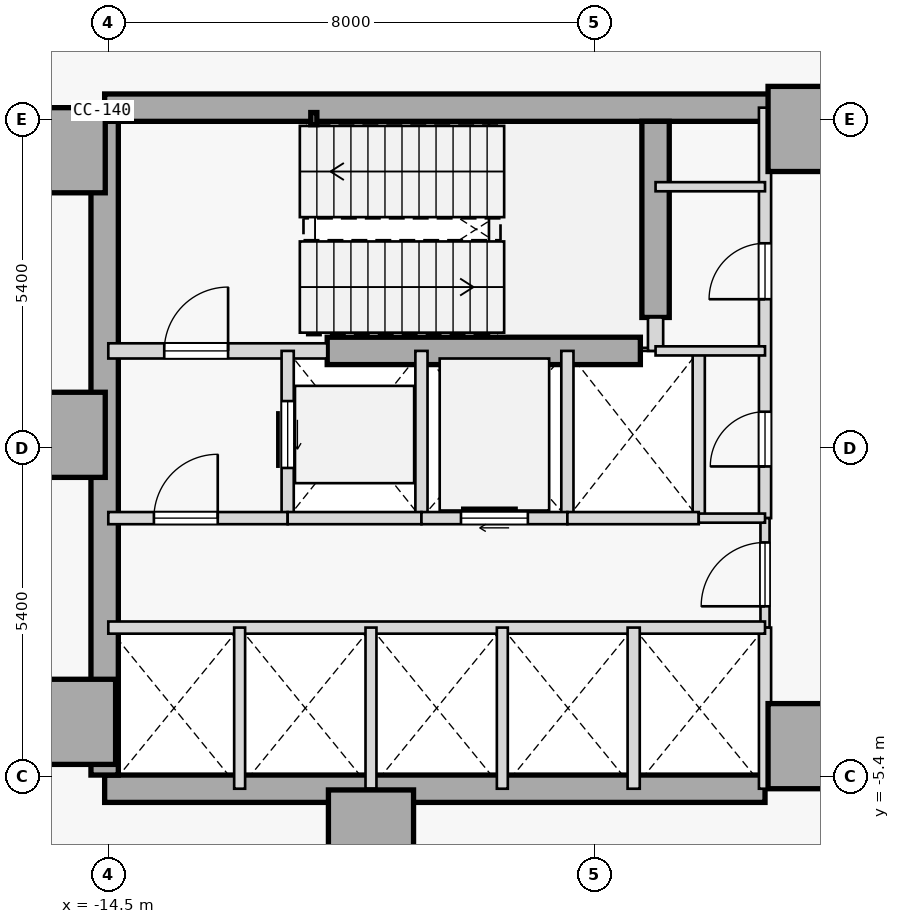
"""IFC4 building model, lengths in metres.
Left out: names, types, materials, properties, quantities, classifications, styles, units other than length and angle.
Written with IfcOpenShell. Run it as: python <this file> out.ifc"""

import sys

from ifc_helpers import new_model, si_unit, direction, frame, frame_2d, origin, origin_2d, place, context, subcontext, project, spatial, rectangle, hollow_rectangle, extrude, element, fill, save


model = new_model("IFC4")
c1 = context("Model", 3, precision=1e-05, world=origin(), true_north=direction((0.0, 1.0)))
c2 = subcontext(c1, "Body", "Model", "MODEL_VIEW")
j1 = project(units=[si_unit("LENGTHUNIT", "METRE"), si_unit("PLANEANGLEUNIT", "RADIAN")], contexts=[c1])
p1 = place(None, origin())
s1 = spatial("IfcSite", under=j1, at=p1, CompositionType="ELEMENT")
p2 = place(p1, origin())
s2 = spatial("IfcBuilding", under=s1, at=p2, CompositionType="ELEMENT")
p3 = place(p2, frame((0.0, 0.0, 78.8)))
s3 = spatial("IfcBuildingStorey", under=s2, at=p3, CompositionType="ELEMENT", Elevation=78.8)
for number, where, z_axis, x_axis in (
    (1, (-15.25, 4.9, 0.0), (0.0, 0.0, 1.0), (1.0, 0.0, 0.0)),
    (2, (-15.25, 0.22, 0.0), (0.0, 0.0, 1.0), (1.0, 0.0, 0.0)),
    (3, (-15.08, -4.5, 0.0), (0.0, 0.0, 1.0), (1.0, 0.0, 0.0)),
    (4, (-10.18, -6.32, 0.0), (0.0, 0.0, 1.0), (1.0, 0.0, 0.0)),
    (5, (-2.95, -4.9, 0.0), (0.0, 0.0, 1.0), (1.0, 0.0, 0.0)),
    (6, (-2.95, 5.25, 0.0), (0.0, 0.0, 1.0), (1.0, 0.0, 0.0)),
):
    element("IfcColumn", number, at=place(p3, frame(where, z_axis=z_axis, x_axis=x_axis)), inside=s3, PredefinedType="COLUMN", context=c2, shape_type="SweptSolid", body=[
        extrude(rectangle(XDim=1.4, YDim=1.4, at=origin_2d()), origin(), (0.0, 0.0, 1.0), 4.4),
    ])
p4 = place(p3, frame((-14.56, 5.6, 0.0), z_axis=(0.0, 0.0, 1.0), x_axis=(1.0, 0.0, 0.0)))
e7 = element("IfcWall", 7, at=p4, inside=s3, PredefinedType="SHEAR", context=c2, shape_type="SweptSolid", body=[
    extrude(rectangle(XDim=11.41, YDim=0.45, at=frame_2d((5.705, 0.0))), origin(), (0.0, 0.0, 1.0), 4.15),
])
p5 = place(p3, frame((-14.56, -5.6, 0.0), z_axis=(0.0, 0.0, 1.0), x_axis=(1.0, 0.0, 0.0)))
e8 = element("IfcWall", 8, at=p5, inside=s3, PredefinedType="SHEAR", context=c2, shape_type="SweptSolid", body=[
    extrude(rectangle(XDim=10.86, YDim=0.45, at=frame_2d((5.43, 0.0))), origin(), (0.0, 0.0, 1.0), 4.15),
])
p6 = place(p3, frame((-14.56, -5.375, 0.0), z_axis=(0.0, 0.0, 1.0), x_axis=(0.0, 1.0, 0.0)))
e9 = element("IfcWall", 9, at=p6, inside=s3, PredefinedType="SHEAR", context=c2, shape_type="SweptSolid", body=[
    extrude(rectangle(XDim=10.75, YDim=0.45, at=frame_2d((5.375, 0.0))), origin(), (0.0, 0.0, 1.0), 4.15),
])
p7 = place(p3, frame((-5.5, 2.15, 0.0), z_axis=(0.0, 0.0, 1.0), x_axis=(0.0, 1.0, 0.0)))
e10 = element("IfcWall", 10, at=p7, inside=s3, PredefinedType="SHEAR", context=c2, shape_type="SweptSolid", body=[
    extrude(rectangle(XDim=3.225, YDim=0.45, at=frame_2d((1.613, 0.0))), origin(), (0.0, 0.0, 1.0), 4.15),
])
p8 = place(p3, frame((-10.9, 1.6, 0.0), z_axis=(0.0, 0.0, 1.0), x_axis=(1.0, 0.0, 0.0)))
e11 = element("IfcWall", 11, at=p8, inside=s3, PredefinedType="SHEAR", context=c2, shape_type="SweptSolid", body=[
    extrude(rectangle(XDim=5.15, YDim=0.45, at=frame_2d((2.575, 0.0))), origin(), (0.0, 0.0, 1.0), 4.15),
])
p9 = place(p3, frame((-11.12, 5.42, 0.0), z_axis=(0.0, 0.0, 1.0), x_axis=(1.0, 0.0, 0.0)))
e12 = element("IfcColumn", 12, at=p9, inside=s3, PredefinedType="COLUMN", context=c2, shape_type="SweptSolid", body=[
    extrude(hollow_rectangle(XDim=0.1, YDim=0.2, WallThickness=0.008, at=origin_2d()), origin(), (0.0, 0.0, 1.0), 4.4),
])
p10 = place(p3, frame((-14.5, 1.6, 0.0), z_axis=(0.0, 0.0, 1.0), x_axis=(1.0, 0.0, 0.0)))
e13 = element("IfcWall", 13, at=p10, inside=s3, PredefinedType="STANDARD", context=c2, shape_type="SweptSolid", body=[
    extrude(rectangle(XDim=3.6, YDim=0.25, at=frame_2d((1.8, 0.0))), origin(), (0.0, 0.0, 1.0), 4.15),
])
p11 = place(p10, frame((0.92, 0.0, 0.0)))
e14 = element("IfcOpeningElement", 14, at=p11, cuts=e13, PredefinedType="OPENING", context=c2, shape_type="SweptSolid", body=[
    extrude(rectangle(XDim=1.05, YDim=2.15, at=frame_2d((0.525, 1.075))), frame((0.0, 0.135, 0.0), z_axis=(0.0, -1.0, 0.0), x_axis=(1.0, 0.0, 0.0)), (0.0, 0.0, 1.0), 0.27),
])
p12 = place(p3, frame((-5.5, 1.6, 0.0), z_axis=(0.0, 0.0, 1.0), x_axis=(0.0, 1.0, 0.0)))
e15 = element("IfcWall", 15, at=p12, inside=s3, PredefinedType="STANDARD", context=c2, shape_type="SweptSolid", body=[
    extrude(rectangle(XDim=0.55, YDim=0.25, at=frame_2d((0.275, 0.0))), origin(), (0.0, 0.0, 1.0), 4.15),
])
p13 = place(p3, frame((-3.7, -1.15, 0.0), z_axis=(0.0, 0.0, 1.0), x_axis=(0.0, 1.0, 0.0)))
e16 = element("IfcWall", 16, at=p13, inside=s3, PredefinedType="STANDARD", context=c2, shape_type="SweptSolid", body=[
    extrude(rectangle(XDim=6.75, YDim=0.2, at=frame_2d((3.375, 0.0))), origin(), (0.0, 0.0, 1.0), 4.15),
])
p14 = place(p13, frame((3.6, 0.0, 0.0)))
e17 = element("IfcOpeningElement", 17, at=p14, cuts=e16, PredefinedType="OPENING", context=c2, shape_type="SweptSolid", body=[
    extrude(rectangle(XDim=0.92, YDim=2.15, at=frame_2d((0.46, 1.075))), frame((0.0, 0.11, 0.0), z_axis=(0.0, -1.0, 0.0), x_axis=(1.0, 0.0, 0.0)), (0.0, 0.0, 1.0), 0.22),
])
p15 = place(p13, frame((0.85, 0.0, 0.0)))
e18 = element("IfcOpeningElement", 18, at=p15, cuts=e16, PredefinedType="OPENING", context=c2, shape_type="SweptSolid", body=[
    extrude(rectangle(XDim=0.9, YDim=2.15, at=frame_2d((0.45, 1.075))), frame((0.0, 0.11, 0.0), z_axis=(0.0, -1.0, 0.0), x_axis=(1.0, 0.0, 0.0)), (0.0, 0.0, 1.0), 0.22),
])
p16 = place(p3, frame((-3.7, -2.95, 0.0), z_axis=(0.0, 0.0, 1.0), x_axis=(0.0, 1.0, 0.0)))
e19 = element("IfcWall", 19, at=p16, inside=s3, PredefinedType="PARTITIONING", context=c2, shape_type="SweptSolid", body=[
    extrude(rectangle(XDim=1.8, YDim=0.15, at=frame_2d((0.9, 0.0))), origin(), (0.0, 0.0, 1.0), 4.15),
])
p17 = place(p16, frame((0.35, 0.0, 0.0)))
e20 = element("IfcOpeningElement", 20, at=p17, cuts=e19, PredefinedType="OPENING", context=c2, shape_type="SweptSolid", body=[
    extrude(rectangle(XDim=1.05, YDim=2.18, at=frame_2d((0.525, 1.09))), frame((0.0, 0.085, 0.0), z_axis=(0.0, -1.0, 0.0), x_axis=(1.0, 0.0, 0.0)), (0.0, 0.0, 1.0), 0.17),
])
p18 = place(p3, frame((-3.7, -5.6, 0.0), z_axis=(0.0, 0.0, 1.0), x_axis=(0.0, 1.0, 0.0)))
e21 = element("IfcWall", 21, at=p18, inside=s3, PredefinedType="STANDARD", context=c2, shape_type="SweptSolid", body=[
    extrude(rectangle(XDim=2.65, YDim=0.2, at=frame_2d((1.325, 0.0))), origin(), (0.0, 0.0, 1.0), 4.15),
])
p19 = place(p3, frame((-11.55, -1.15, 0.0), z_axis=(0.0, 0.0, 1.0), x_axis=(0.0, 1.0, 0.0)))
e22 = element("IfcWall", 22, at=p19, inside=s3, PredefinedType="STANDARD", context=c2, shape_type="SweptSolid", body=[
    extrude(rectangle(XDim=2.75, YDim=0.2, at=frame_2d((1.375, 0.0))), origin(), (0.0, 0.0, 1.0), 4.15),
])
p20 = place(p19, frame((0.825, 0.0, 0.0)))
e23 = element("IfcOpeningElement", 23, at=p20, cuts=e22, PredefinedType="OPENING", context=c2, shape_type="SweptSolid", body=[
    extrude(rectangle(XDim=1.1, YDim=2.15, at=frame_2d((0.55, 1.075))), frame((0.0, 0.11, 0.0), z_axis=(0.0, -1.0, 0.0), x_axis=(1.0, 0.0, 0.0)), (0.0, 0.0, 1.0), 0.22),
])
p21 = place(p3, frame((-9.35, -1.15, 0.0), z_axis=(0.0, 0.0, 1.0), x_axis=(0.0, 1.0, 0.0)))
e24 = element("IfcWall", 24, at=p21, inside=s3, PredefinedType="STANDARD", context=c2, shape_type="SweptSolid", body=[
    extrude(rectangle(XDim=2.75, YDim=0.2, at=frame_2d((1.375, 0.0))), origin(), (0.0, 0.0, 1.0), 4.15),
])
p22 = place(p3, frame((-14.5, -1.15, 0.0), z_axis=(0.0, 0.0, 1.0), x_axis=(1.0, 0.0, 0.0)))
e25 = element("IfcWall", 25, at=p22, inside=s3, PredefinedType="STANDARD", context=c2, shape_type="SweptSolid", body=[
    extrude(rectangle(XDim=2.95, YDim=0.2, at=frame_2d((1.475, 0.0))), origin(), (0.0, 0.0, 1.0), 4.15),
])
p23 = place(p22, frame((0.75, 0.0, 0.0)))
e26 = element("IfcOpeningElement", 26, at=p23, cuts=e25, PredefinedType="OPENING", context=c2, shape_type="SweptSolid", body=[
    extrude(rectangle(XDim=1.05, YDim=2.18, at=frame_2d((0.525, 1.09))), frame((0.0, 0.11, 0.0), z_axis=(0.0, -1.0, 0.0), x_axis=(1.0, 0.0, 0.0)), (0.0, 0.0, 1.0), 0.22),
])
p24 = place(p3, frame((-11.55, -1.15, 0.0), z_axis=(0.0, 0.0, 1.0), x_axis=(1.0, 0.0, 0.0)))
e27 = element("IfcWall", 27, at=p24, inside=s3, PredefinedType="STANDARD", context=c2, shape_type="SweptSolid", body=[
    extrude(rectangle(XDim=2.2, YDim=0.2, at=frame_2d((1.1, 0.0))), origin(), (0.0, 0.0, 1.0), 4.15),
])
p25 = place(p3, frame((-6.95, -1.15, 0.0), z_axis=(0.0, 0.0, 1.0), x_axis=(0.0, 1.0, 0.0)))
e28 = element("IfcWall", 28, at=p25, inside=s3, PredefinedType="STANDARD", context=c2, shape_type="SweptSolid", body=[
    extrude(rectangle(XDim=2.75, YDim=0.2, at=frame_2d((1.375, 0.0))), origin(), (0.0, 0.0, 1.0), 4.15),
])
p26 = place(p3, frame((-9.35, -1.15, 0.0), z_axis=(0.0, 0.0, 1.0), x_axis=(1.0, 0.0, 0.0)))
e29 = element("IfcWall", 29, at=p26, inside=s3, PredefinedType="STANDARD", context=c2, shape_type="SweptSolid", body=[
    extrude(rectangle(XDim=2.4, YDim=0.2, at=frame_2d((1.2, 0.0))), origin(), (0.0, 0.0, 1.0), 4.15),
])
p27 = place(p26, frame((0.65, 0.0, 0.0)))
e30 = element("IfcOpeningElement", 30, at=p27, cuts=e29, PredefinedType="OPENING", context=c2, shape_type="SweptSolid", body=[
    extrude(rectangle(XDim=1.1, YDim=2.15, at=frame_2d((0.55, 1.075))), frame((0.0, 0.11, 0.0), z_axis=(0.0, -1.0, 0.0), x_axis=(1.0, 0.0, 0.0)), (0.0, 0.0, 1.0), 0.22),
])
p28 = place(p3, frame((-4.79, -1.15, 0.0), z_axis=(0.0, 0.0, 1.0), x_axis=(0.0, 1.0, 0.0)))
e31 = element("IfcWall", 31, at=p28, inside=s3, PredefinedType="STANDARD", context=c2, shape_type="SweptSolid", body=[
    extrude(rectangle(XDim=2.75, YDim=0.2, at=frame_2d((1.375, 0.0))), origin(), (0.0, 0.0, 1.0), 4.15),
])
p29 = place(p3, frame((-6.95, -1.15, 0.0), z_axis=(0.0, 0.0, 1.0), x_axis=(1.0, 0.0, 0.0)))
e32 = element("IfcWall", 32, at=p29, inside=s3, PredefinedType="STANDARD", context=c2, shape_type="SweptSolid", body=[
    extrude(rectangle(XDim=2.16, YDim=0.2, at=frame_2d((1.08, 0.0))), origin(), (0.0, 0.0, 1.0), 4.15),
])
p30 = place(p3, frame((-4.79, -1.15, 0.0), z_axis=(0.0, 0.0, 1.0), x_axis=(1.0, 0.0, 0.0)))
e33 = element("IfcWall", 33, at=p30, inside=s3, PredefinedType="PARTITIONING", context=c2, shape_type="SweptSolid", body=[
    extrude(rectangle(XDim=1.09, YDim=0.15, at=frame_2d((0.545, 0.0))), origin(), (0.0, 0.0, 1.0), 4.15),
])
p31 = place(p3, frame((-14.5, -2.95, 0.0), z_axis=(0.0, 0.0, 1.0), x_axis=(1.0, 0.0, 0.0)))
e34 = element("IfcWall", 34, at=p31, inside=s3, PredefinedType="STANDARD", context=c2, shape_type="SweptSolid", body=[
    extrude(rectangle(XDim=10.8, YDim=0.2, at=frame_2d((5.4, 0.0))), origin(), (0.0, 0.0, 1.0), 4.15),
])
p32 = place(p3, frame((-5.86, -5.6, 0.0), z_axis=(0.0, 0.0, 1.0), x_axis=(0.0, 1.0, 0.0)))
e35 = element("IfcWall", 35, at=p32, inside=s3, PredefinedType="STANDARD", context=c2, shape_type="SweptSolid", body=[
    extrude(rectangle(XDim=2.65, YDim=0.2, at=frame_2d((1.325, 0.0))), origin(), (0.0, 0.0, 1.0), 4.15),
])
for number, where, z_axis, x_axis in (
    (36, (-12.34, -5.6, 0.0), (0.0, 0.0, 1.0), (0.0, 1.0, 0.0)),
    (37, (-10.18, -5.6, 0.0), (0.0, 0.0, 1.0), (0.0, 1.0, 0.0)),
    (38, (-8.02, -5.6, 0.0), (0.0, 0.0, 1.0), (0.0, 1.0, 0.0)),
):
    element("IfcWall", number, at=place(p3, frame(where, z_axis=z_axis, x_axis=x_axis)), inside=s3, PredefinedType="STANDARD", context=c2, shape_type="SweptSolid", body=[
        extrude(rectangle(XDim=2.65, YDim=0.18, at=frame_2d((1.325, 0.0))), origin(), (0.0, 0.0, 1.0), 4.15),
    ])
for number, where, z_axis, x_axis in (
    (39, (-5.5, 4.3, 0.0), (0.0, 0.0, 1.0), (1.0, 0.0, 0.0)),
    (40, (-5.5, 1.6, 0.0), (0.0, 0.0, 1.0), (1.0, 0.0, 0.0)),
):
    element("IfcWall", number, at=place(p3, frame(where, z_axis=z_axis, x_axis=x_axis)), inside=s3, PredefinedType="PARTITIONING", context=c2, shape_type="SweptSolid", body=[
        extrude(rectangle(XDim=1.8, YDim=0.15, at=frame_2d((0.9, 0.0))), origin(), (0.0, 0.0, 1.0), 4.15),
    ])
p33 = place(p11, origin())
e41 = element("IfcDoor", 41, at=p33, inside=s3, OperationType="SINGLE_SWING_RIGHT", PredefinedType="DOOR", context=c2, shape_type="SweptSolid", body=[
    extrude(rectangle(XDim=1.05, YDim=2.15, at=frame_2d((0.525, 1.075))), frame((0.0, 0.025, 0.0), z_axis=(0.0, -1.0, 0.0), x_axis=(1.0, 0.0, 0.0)), (0.0, 0.0, 1.0), 0.05),
])
fill(e14, e41)
p34 = place(p23, origin())
e42 = element("IfcDoor", 42, at=p34, inside=s3, OperationType="SINGLE_SWING_RIGHT", PredefinedType="DOOR", context=c2, shape_type="SweptSolid", body=[
    extrude(rectangle(XDim=1.05, YDim=2.18, at=frame_2d((0.525, 1.09))), frame((0.0, 0.025, 0.0), z_axis=(0.0, -1.0, 0.0), x_axis=(1.0, 0.0, 0.0)), (0.0, 0.0, 1.0), 0.05),
])
fill(e26, e42)
p35 = place(p17, origin())
e43 = element("IfcDoor", 43, at=p35, inside=s3, OperationType="SINGLE_SWING_LEFT", PredefinedType="DOOR", context=c2, shape_type="SweptSolid", body=[
    extrude(rectangle(XDim=1.05, YDim=2.18, at=frame_2d((0.525, 1.09))), frame((0.0, 0.025, 0.0), z_axis=(0.0, -1.0, 0.0), x_axis=(1.0, 0.0, 0.0)), (0.0, 0.0, 1.0), 0.05),
])
fill(e20, e43)
p36 = place(p20, origin())
e44 = element("IfcDoor", 44, at=p36, inside=s3, OperationType="SLIDING_TO_RIGHT", PredefinedType="DOOR", context=c2, shape_type="SweptSolid", body=[
    extrude(rectangle(XDim=1.1, YDim=2.15, at=frame_2d((0.55, 1.075))), frame((0.0, 0.025, 0.0), z_axis=(0.0, -1.0, 0.0), x_axis=(1.0, 0.0, 0.0)), (0.0, 0.0, 1.0), 0.05),
])
fill(e23, e44)
p37 = place(p27, origin())
e45 = element("IfcDoor", 45, at=p37, inside=s3, OperationType="SLIDING_TO_RIGHT", PredefinedType="DOOR", context=c2, shape_type="SweptSolid", body=[
    extrude(rectangle(XDim=1.1, YDim=2.15, at=frame_2d((0.55, 1.075))), frame((0.0, 0.025, 0.0), z_axis=(0.0, -1.0, 0.0), x_axis=(1.0, 0.0, 0.0)), (0.0, 0.0, 1.0), 0.05),
])
fill(e30, e45)
p38 = place(p14, origin())
e46 = element("IfcDoor", 46, at=p38, inside=s3, OperationType="SINGLE_SWING_LEFT", PredefinedType="DOOR", context=c2, shape_type="SweptSolid", body=[
    extrude(rectangle(XDim=0.92, YDim=2.15, at=frame_2d((0.46, 1.075))), frame((0.0, 0.025, 0.0), z_axis=(0.0, -1.0, 0.0), x_axis=(1.0, 0.0, 0.0)), (0.0, 0.0, 1.0), 0.05),
])
fill(e17, e46)
p39 = place(p15, origin())
e47 = element("IfcDoor", 47, at=p39, inside=s3, OperationType="SINGLE_SWING_LEFT", PredefinedType="DOOR", context=c2, shape_type="SweptSolid", body=[
    extrude(rectangle(XDim=0.9, YDim=2.15, at=frame_2d((0.45, 1.075))), frame((0.0, 0.025, 0.0), z_axis=(0.0, -1.0, 0.0), x_axis=(1.0, 0.0, 0.0)), (0.0, 0.0, 1.0), 0.05),
])
fill(e18, e47)
save(model, sys.argv[1])
